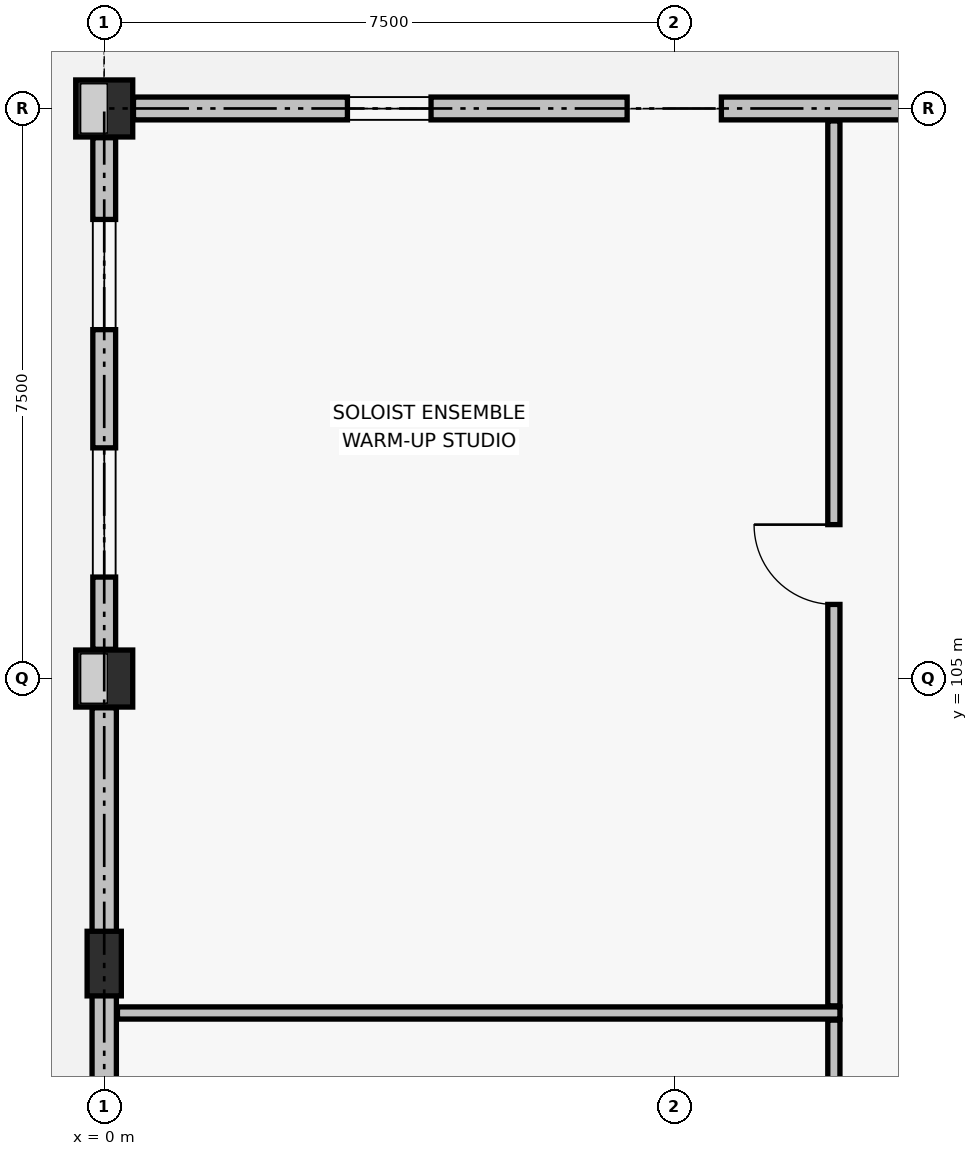
"""IFC4 building model, lengths in metres.
Left out: names, types, materials, properties, quantities, classifications, styles, units other than length and angle.
Written with IfcOpenShell. Run it as: python <this file> out.ifc"""

import sys

from ifc_helpers import new_model, si_unit, direction, frame, frame_2d, origin, origin_2d, place, context, subcontext, project, spatial, rectangle, extrude, element, fill, save


model = new_model("IFC4")
c1 = context("Model", 3, precision=1e-05, world=origin(), true_north=direction((0.0, 1.0)))
c2 = subcontext(c1, "Body", "Model", "MODEL_VIEW")
j1 = project(units=[si_unit("LENGTHUNIT", "METRE"), si_unit("PLANEANGLEUNIT", "RADIAN")], contexts=[c1])
p1 = place(None, origin())
s1 = spatial("IfcSite", under=j1, at=p1, CompositionType="ELEMENT")
p2 = place(p1, origin())
s2 = spatial("IfcBuilding", under=s1, at=p2, CompositionType="ELEMENT")
p3 = place(p2, origin())
s3 = spatial("IfcBuildingStorey", under=s2, at=p3, CompositionType="ELEMENT", Elevation=0.0)
for number, where, z_axis, x_axis in (
    (1, (0.0, 105.0, 0.0), (0.0, 0.0, 1.0), (1.0, 0.0, 0.0)),
    (2, (0.0, 112.5, 0.0), (0.0, 0.0, 1.0), (1.0, 0.0, 0.0)),
):
    element("IfcColumn", number, at=place(p3, frame(where, z_axis=z_axis, x_axis=x_axis)), inside=s3, PredefinedType="COLUMN", context=c2, shape_type="SweptSolid", body=[
        extrude(rectangle(XDim=0.75, YDim=0.75, at=origin_2d()), origin(), (0.0, 0.0, 1.0), 4.8),
    ])
p4 = place(p3, frame((0.0, 101.25, 0.0), z_axis=(0.0, 0.0, 1.0), x_axis=(1.0, 0.0, 0.0)))
e3 = element("IfcColumn", 3, at=p4, inside=s3, PredefinedType="PILASTER", context=c2, shape_type="SweptSolid", body=[
    extrude(rectangle(XDim=0.45, YDim=0.85, at=origin_2d()), origin(), (0.0, 0.0, 1.0), 4.8),
])
p5 = place(p3, frame((0.385, 112.5, 0.0), z_axis=(0.0, 0.0, 1.0), x_axis=(1.0, 0.0, 0.0)))
e4 = element("IfcWall", 4, at=p5, inside=s3, PredefinedType="SOLIDWALL", context=c2, shape_type="SweptSolid", body=[
    extrude(rectangle(XDim=6.495, YDim=0.3, at=frame_2d((3.248, 0.0))), origin(), (0.0, 0.0, 1.0), 2.97),
])
p6 = place(p5, frame((2.815, 0.0, 0.6)))
e5 = element("IfcOpeningElement", 5, at=p6, cuts=e4, PredefinedType="OPENING", context=c2, shape_type="SweptSolid", body=[
    extrude(rectangle(XDim=1.1, YDim=1.8, at=frame_2d((0.55, 0.9))), frame((0.0, 0.16, 0.0), z_axis=(0.0, -1.0, 0.0), x_axis=(1.0, 0.0, 0.0)), (0.0, 0.0, 1.0), 0.32),
])
p7 = place(p3, frame((8.12, 112.5, 0.0), z_axis=(0.0, 0.0, 1.0), x_axis=(1.0, 0.0, 0.0)))
e6 = element("IfcWall", 6, at=p7, inside=s3, PredefinedType="SOLIDWALL", context=c2, shape_type="SweptSolid", body=[
    extrude(rectangle(XDim=6.495, YDim=0.3, at=frame_2d((3.248, 0.0))), origin(), (0.0, 0.0, 1.0), 2.97),
])
p8 = place(p7, frame((2.505, 0.0, 0.6)))
e7 = element("IfcOpeningElement", 7, at=p8, cuts=e6, PredefinedType="OPENING", context=c2, shape_type="SweptSolid", body=[
    extrude(rectangle(XDim=1.25, YDim=1.8, at=frame_2d((0.625, 0.9))), frame((0.0, 0.16, 0.0), z_axis=(0.0, -1.0, 0.0), x_axis=(1.0, 0.0, 0.0)), (0.0, 0.0, 1.0), 0.32),
])
p9 = place(p3, frame((0.0, 97.885, 0.0), z_axis=(0.0, 0.0, 1.0), x_axis=(0.0, 1.0, 0.0)))
e8 = element("IfcWall", 8, at=p9, inside=s3, PredefinedType="SOLIDWALL", context=c2, shape_type="SweptSolid", body=[
    extrude(rectangle(XDim=6.73, YDim=0.32, at=frame_2d((3.365, 0.0))), origin(), (0.0, 0.0, 1.0), 2.97),
])
p10 = place(p3, frame((0.0, 105.385, 0.0), z_axis=(0.0, 0.0, 1.0), x_axis=(0.0, 1.0, 0.0)))
e9 = element("IfcWall", 9, at=p10, inside=s3, PredefinedType="SOLIDWALL", context=c2, shape_type="SweptSolid", body=[
    extrude(rectangle(XDim=6.73, YDim=0.3, at=frame_2d((3.365, 0.0))), origin(), (0.0, 0.0, 1.0), 2.97),
])
p11 = place(p10, frame((0.95, 0.0, 0.6)))
e10 = element("IfcOpeningElement", 10, at=p11, cuts=e9, PredefinedType="OPENING", context=c2, shape_type="SweptSolid", body=[
    extrude(rectangle(XDim=1.7, YDim=1.8, at=frame_2d((0.85, 0.9))), frame((0.0, 0.16, 0.0), z_axis=(0.0, -1.0, 0.0), x_axis=(1.0, 0.0, 0.0)), (0.0, 0.0, 1.0), 0.32),
])
p12 = place(p10, frame((4.205, 0.0, 0.6)))
e11 = element("IfcOpeningElement", 11, at=p12, cuts=e9, PredefinedType="OPENING", context=c2, shape_type="SweptSolid", body=[
    extrude(rectangle(XDim=1.45, YDim=1.3, at=frame_2d((0.725, 0.65))), frame((0.0, 0.16, 0.0), z_axis=(0.0, -1.0, 0.0), x_axis=(1.0, 0.0, 0.0)), (0.0, 0.0, 1.0), 0.32),
])
p13 = place(p3, frame((0.174, 100.6, 0.0), z_axis=(0.0, 0.0, 1.0), x_axis=(1.0, 0.0, 0.0)))
e12 = element("IfcWall", 12, at=p13, inside=s3, PredefinedType="PARTITIONING", context=c2, shape_type="SweptSolid", body=[
    extrude(rectangle(XDim=9.506, YDim=0.16, at=frame_2d((4.753, 0.0))), origin(), (0.0, 0.0, 1.0), 3.72),
])
p14 = place(p3, frame((9.6, 97.594, 0.0), z_axis=(0.0, 0.0, 1.0), x_axis=(0.0, 1.0, 0.0)))
e13 = element("IfcWall", 13, at=p14, inside=s3, PredefinedType="PARTITIONING", context=c2, shape_type="SweptSolid", body=[
    extrude(rectangle(XDim=2.912, YDim=0.16, at=frame_2d((1.456, 0.0))), origin(), (0.0, 0.0, 1.0), 2.97),
])
p15 = place(p14, frame((0.981, 0.0, 0.0)))
e14 = element("IfcOpeningElement", 14, at=p15, cuts=e13, PredefinedType="OPENING", context=c2, shape_type="SweptSolid", body=[
    extrude(rectangle(XDim=0.95, YDim=2.1, at=frame_2d((0.475, 1.05))), frame((0.0, 0.09, 0.0), z_axis=(0.0, -1.0, 0.0), x_axis=(1.0, 0.0, 0.0)), (0.0, 0.0, 1.0), 0.18),
])
p16 = place(p3, frame((9.6, 100.694, 0.0), z_axis=(0.0, 0.0, 1.0), x_axis=(0.0, 1.0, 0.0)))
e15 = element("IfcWall", 15, at=p16, inside=s3, PredefinedType="PARTITIONING", context=c2, shape_type="SweptSolid", body=[
    extrude(rectangle(XDim=11.642, YDim=0.16, at=frame_2d((5.821, 0.0))), origin(), (0.0, 0.0, 1.0), 2.97),
])
p17 = place(p16, frame((5.281, 0.0, 0.0)))
e16 = element("IfcOpeningElement", 16, at=p17, cuts=e15, PredefinedType="OPENING", context=c2, shape_type="SweptSolid", body=[
    extrude(rectangle(XDim=1.05, YDim=2.12, at=frame_2d((0.525, 1.06))), frame((0.0, 0.09, 0.0), z_axis=(0.0, -1.0, 0.0), x_axis=(1.0, 0.0, 0.0)), (0.0, 0.0, 1.0), 0.18),
])
p18 = place(p6, origin())
e17 = element("IfcWindow", 17, at=p18, inside=s3, PartitioningType="SINGLE_PANEL", PredefinedType="WINDOW", context=c2, shape_type="SweptSolid", body=[
    extrude(rectangle(XDim=1.1, YDim=1.8, at=frame_2d((0.55, 0.9))), frame((0.0, 0.03, 0.0), z_axis=(0.0, -1.0, 0.0), x_axis=(1.0, 0.0, 0.0)), (0.0, 0.0, 1.0), 0.06),
])
fill(e5, e17)
p19 = place(p11, origin())
e18 = element("IfcWindow", 18, at=p19, inside=s3, PartitioningType="SINGLE_PANEL", PredefinedType="WINDOW", context=c2, shape_type="SweptSolid", body=[
    extrude(rectangle(XDim=1.7, YDim=1.8, at=frame_2d((0.85, 0.9))), frame((0.0, 0.03, 0.0), z_axis=(0.0, -1.0, 0.0), x_axis=(1.0, 0.0, 0.0)), (0.0, 0.0, 1.0), 0.06),
])
fill(e10, e18)
p20 = place(p12, origin())
e19 = element("IfcWindow", 19, at=p20, inside=s3, PartitioningType="SINGLE_PANEL", PredefinedType="WINDOW", context=c2, shape_type="SweptSolid", body=[
    extrude(rectangle(XDim=1.45, YDim=1.3, at=frame_2d((0.725, 0.65))), frame((0.0, 0.03, 0.0), z_axis=(0.0, -1.0, 0.0), x_axis=(1.0, 0.0, 0.0)), (0.0, 0.0, 1.0), 0.06),
])
fill(e11, e19)
p21 = place(p17, origin())
e20 = element("IfcDoor", 20, at=p21, inside=s3, OperationType="SINGLE_SWING_RIGHT", PredefinedType="DOOR", context=c2, shape_type="SweptSolid", body=[
    extrude(rectangle(XDim=1.05, YDim=2.12, at=frame_2d((0.525, 1.06))), frame((0.0, 0.025, 0.0), z_axis=(0.0, -1.0, 0.0), x_axis=(1.0, 0.0, 0.0)), (0.0, 0.0, 1.0), 0.05),
])
fill(e16, e20)
save(model, sys.argv[1])
